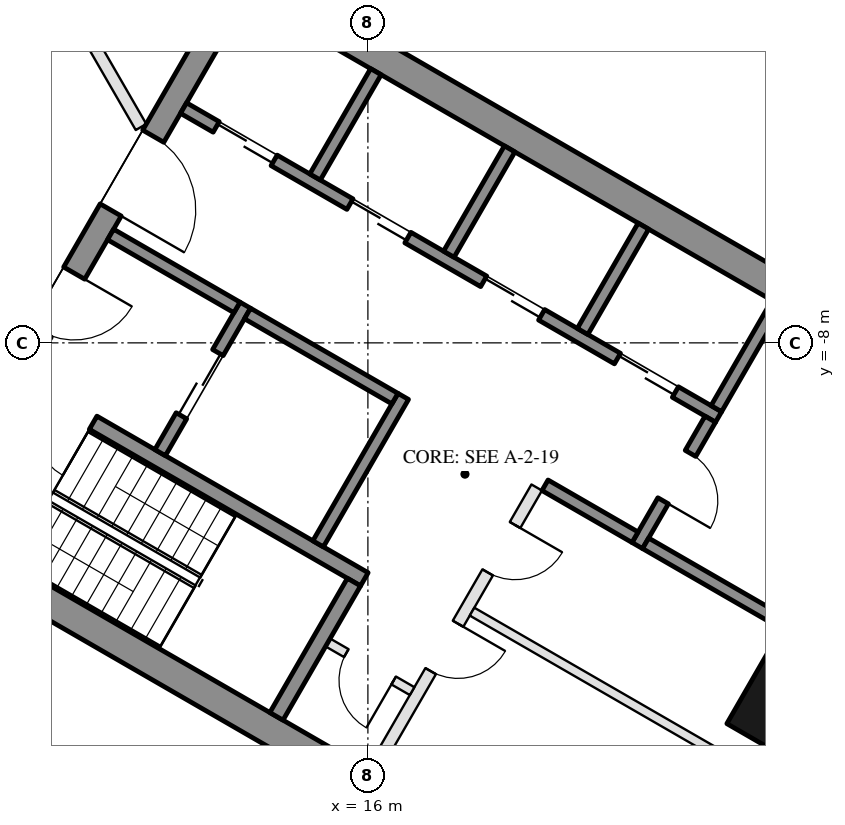
"""IFC4 building model, lengths in metres.
Left out: names, types, materials, properties, quantities, classifications, styles, units other than length and angle.
Written with IfcOpenShell. Run it as: python <this file> out.ifc"""

import sys

from ifc_helpers import new_model, si_unit, direction, frame, frame_2d, origin, origin_2d, place, context, subcontext, project, spatial, rectangle, hollow_rectangle, extrude, element, fill, save


model = new_model("IFC4")
c1 = context("Model", 3, precision=1e-05, world=origin(), true_north=direction((0.0, 1.0)))
c2 = subcontext(c1, "Body", "Model", "MODEL_VIEW")
j1 = project(units=[si_unit("LENGTHUNIT", "METRE"), si_unit("PLANEANGLEUNIT", "RADIAN")], contexts=[c1])
p1 = place(None, origin())
s1 = spatial("IfcSite", under=j1, at=p1, CompositionType="ELEMENT")
p2 = place(p1, origin())
s2 = spatial("IfcBuilding", under=s1, at=p2, CompositionType="ELEMENT")
p3 = place(p2, frame((0.0, 0.0, 90.9)))
s3 = spatial("IfcBuildingStorey", under=s2, at=p3, CompositionType="ELEMENT", Elevation=90.9)
p4 = place(p3, frame((23.643, -13.65, 0.0), z_axis=(0.0, 0.0, 1.0), x_axis=(0.5, 0.866025403784, 0.0)))
e1 = element("IfcColumn", 1, at=p4, inside=s3, PredefinedType="COLUMN", context=c2, shape_type="SweptSolid", body=[
    extrude(hollow_rectangle(XDim=2.8, YDim=2.4, WallThickness=0.07, at=origin_2d()), origin(), (0.0, 0.0, 1.0), 3.7),
])
p5 = place(p3, frame((26.257, -6.567, 0.0), z_axis=(0.0, 0.0, 1.0), x_axis=(-0.500023526245, 0.866011820475, 0.0)))
e2 = element("IfcWall", 2, at=p5, inside=s3, PredefinedType="SOLIDWALL", context=c2, shape_type="SweptSolid", body=[
    extrude(rectangle(XDim=11.816, YDim=0.35, at=frame_2d((5.908, 0.0))), origin(), (0.0, 0.0, 1.0), 3.55),
])
p6 = place(p5, frame((0.38, 0.0, 0.3)))
e3 = element("IfcOpeningElement", 3, at=p6, cuts=e2, PredefinedType="OPENING", context=c2, shape_type="SweptSolid", body=[
    extrude(rectangle(XDim=1.8, YDim=2.65, at=frame_2d((0.9, 1.325))), frame((0.0, 0.185, 0.0), z_axis=(0.0, -1.0, 0.0), x_axis=(1.0, 0.0, 0.0)), (0.0, 0.0, 1.0), 0.37),
])
p7 = place(p5, frame((7.716, 0.0, 0.0)))
e4 = element("IfcOpeningElement", 4, at=p7, cuts=e2, PredefinedType="OPENING", context=c2, shape_type="SweptSolid", body=[
    extrude(rectangle(XDim=2.4, YDim=2.4, at=frame_2d((1.2, 1.2))), frame((0.0, 0.185, 0.0), z_axis=(0.0, -1.0, 0.0), x_axis=(1.0, 0.0, 0.0)), (0.0, 0.0, 1.0), 0.37),
])
p8 = place(p5, frame((3.816, 0.0, 0.3)))
e5 = element("IfcOpeningElement", 5, at=p8, cuts=e2, PredefinedType="OPENING", context=c2, shape_type="SweptSolid", body=[
    extrude(rectangle(XDim=1.6, YDim=2.65, at=frame_2d((0.8, 1.325))), frame((0.0, 0.185, 0.0), z_axis=(0.0, -1.0, 0.0), x_axis=(1.0, 0.0, 0.0)), (0.0, 0.0, 1.0), 0.37),
])
p9 = place(p5, frame((5.716, 0.0, 0.3)))
e6 = element("IfcOpeningElement", 6, at=p9, cuts=e2, PredefinedType="OPENING", context=c2, shape_type="SweptSolid", body=[
    extrude(rectangle(XDim=1.6, YDim=2.65, at=frame_2d((0.8, 1.325))), frame((0.0, 0.185, 0.0), z_axis=(0.0, -1.0, 0.0), x_axis=(1.0, 0.0, 0.0)), (0.0, 0.0, 1.0), 0.37),
])
for number, where, z_axis, x_axis in (
    (7, (8.547, -10.997, 0.0), (0.0, 0.0, 1.0), (0.866, -0.5, 0.0)),
    (8, (13.797, -1.903, 0.0), (0.0, 0.0, 1.0), (0.866, -0.5, 0.0)),
):
    element("IfcWall", number, at=place(p3, frame(where, z_axis=z_axis, x_axis=x_axis)), inside=s3, PredefinedType="SHEAR", context=c2, shape_type="SweptSolid", body=[
        extrude(rectangle(XDim=14.837, YDim=0.5, at=frame_2d((7.418, 0.0))), origin(), (0.0, 0.0, 1.0), 3.5),
    ])
p10 = place(p3, frame((8.845, -10.88, 0.0), z_axis=(0.0, 0.0, 1.0), x_axis=(0.500004234368, 0.866022959057, 0.0)))
e9 = element("IfcWall", 9, at=p10, inside=s3, PredefinedType="SHEAR", context=c2, shape_type="SweptSolid", body=[
    extrude(rectangle(XDim=10.0, YDim=0.4, at=frame_2d((5.0, 0.0))), origin(), (0.0, 0.0, 1.0), 3.5),
])
p11 = place(p10, frame((3.55, 0.0, 0.0)))
e10 = element("IfcOpeningElement", 10, at=p11, cuts=e9, PredefinedType="OPENING", context=c2, shape_type="SweptSolid", body=[
    extrude(rectangle(XDim=1.1, YDim=2.1, at=frame_2d((0.55, 1.05))), frame((0.0, 0.21, 0.0), z_axis=(0.0, -1.0, 0.0), x_axis=(1.0, 0.0, 0.0)), (0.0, 0.0, 1.0), 0.42),
])
p12 = place(p10, frame((5.85, 0.0, 0.0)))
e11 = element("IfcOpeningElement", 11, at=p12, cuts=e9, PredefinedType="OPENING", context=c2, shape_type="SweptSolid", body=[
    extrude(rectangle(XDim=1.4, YDim=2.1, at=frame_2d((0.7, 1.05))), frame((0.0, 0.21, 0.0), z_axis=(0.0, -1.0, 0.0), x_axis=(1.0, 0.0, 0.0)), (0.0, 0.0, 1.0), 0.42),
])
p13 = place(p3, frame((10.356, -8.664, 0.0), z_axis=(0.0, 0.0, 1.0), x_axis=(0.866028629588, -0.499994412703, 0.0)))
e12 = element("IfcWall", 12, at=p13, inside=s3, PredefinedType="SHEAR", context=c2, shape_type="SweptSolid", body=[
    extrude(rectangle(XDim=6.45, YDim=0.25, at=frame_2d((3.225, 0.0))), origin(), (0.0, 0.0, 1.0), 3.5),
])
p14 = place(p13, frame((0.3, 0.0, 0.0)))
e13 = element("IfcOpeningElement", 13, at=p14, cuts=e12, PredefinedType="OPENING", context=c2, shape_type="SweptSolid", body=[
    extrude(rectangle(XDim=1.0, YDim=2.1, at=frame_2d((0.5, 1.05))), frame((0.0, 0.135, 0.0), z_axis=(0.0, -1.0, 0.0), x_axis=(1.0, 0.0, 0.0)), (0.0, 0.0, 1.0), 0.27),
])
p15 = place(p3, frame((14.496, -14.143, 0.0), z_axis=(0.0, 0.0, 1.0), x_axis=(0.500062241894, 0.865989465428, 0.0)))
e14 = element("IfcWall", 14, at=p15, inside=s3, PredefinedType="SHEAR", context=c2, shape_type="SweptSolid", body=[
    extrude(rectangle(XDim=2.55, YDim=0.25, at=frame_2d((1.275, 0.0))), origin(), (0.0, 0.0, 1.0), 3.5),
])
p16 = place(p3, frame((15.181, -11.305, 0.0), z_axis=(0.0, 0.0, 1.0), x_axis=(0.49994636267, 0.866056369097, 0.0)))
e15 = element("IfcWall", 15, at=p16, inside=s3, PredefinedType="SHEAR", context=c2, shape_type="SweptSolid", body=[
    extrude(rectangle(XDim=2.8, YDim=0.2, at=frame_2d((1.4, 0.0))), origin(), (0.0, 0.0, 1.0), 3.5),
])
p17 = place(p3, frame((12.583, -9.805, 0.0), z_axis=(0.0, 0.0, 1.0), x_axis=(0.49994636267, 0.866056369097, 0.0)))
e16 = element("IfcWall", 16, at=p17, inside=s3, PredefinedType="SHEAR", context=c2, shape_type="SweptSolid", body=[
    extrude(rectangle(XDim=2.8, YDim=0.2, at=frame_2d((1.4, 0.0))), origin(), (0.0, 0.0, 1.0), 3.5),
])
p18 = place(p17, frame((0.7, 0.0, 0.0)))
e17 = element("IfcOpeningElement", 17, at=p18, cuts=e16, PredefinedType="OPENING", context=c2, shape_type="SweptSolid", body=[
    extrude(rectangle(XDim=1.2, YDim=2.1, at=frame_2d((0.6, 1.05))), frame((0.0, 0.11, 0.0), z_axis=(0.0, -1.0, 0.0), x_axis=(1.0, 0.0, 0.0)), (0.0, 0.0, 1.0), 0.22),
])
p19 = place(p3, frame((11.768, -6.217, 0.0), z_axis=(0.0, 0.0, 1.0), x_axis=(0.866050077142, -0.499957262057, 0.0)))
e18 = element("IfcWall", 18, at=p19, inside=s3, PredefinedType="SHEAR", context=c2, shape_type="SweptSolid", body=[
    extrude(rectangle(XDim=2.4, YDim=0.2, at=frame_2d((1.2, 0.0))), origin(), (0.0, 0.0, 1.0), 3.5),
])
p20 = place(p3, frame((14.02, -7.517, 0.0), z_axis=(0.0, 0.0, 1.0), x_axis=(0.866034573852, -0.49998411664, 0.0)))
e19 = element("IfcWall", 19, at=p20, inside=s3, PredefinedType="SHEAR", context=c2, shape_type="SweptSolid", body=[
    extrude(rectangle(XDim=2.8, YDim=0.2, at=frame_2d((1.4, 0.0))), origin(), (0.0, 0.0, 1.0), 3.5),
])
p21 = place(p3, frame((12.968, -4.138, 0.0), z_axis=(0.0, 0.0, 1.0), x_axis=(0.866028328073, -0.49999493495, 0.0)))
e20 = element("IfcWall", 20, at=p21, inside=s3, PredefinedType="SHEAR", context=c2, shape_type="SweptSolid", body=[
    extrude(rectangle(XDim=10.16, YDim=0.2, at=frame_2d((5.08, 0.0))), origin(), (0.0, 0.0, 1.0), 3.5),
])
p22 = place(p21, frame((0.62, 0.0, 0.0)))
e21 = element("IfcOpeningElement", 21, at=p22, cuts=e20, PredefinedType="OPENING", context=c2, shape_type="SweptSolid", body=[
    extrude(rectangle(XDim=1.1, YDim=2.1, at=frame_2d((0.55, 1.05))), frame((0.0, 0.11, 0.0), z_axis=(0.0, -1.0, 0.0), x_axis=(1.0, 0.0, 0.0)), (0.0, 0.0, 1.0), 0.22),
])
p23 = place(p21, frame((3.16, 0.0, 0.0)))
e22 = element("IfcOpeningElement", 22, at=p23, cuts=e20, PredefinedType="OPENING", context=c2, shape_type="SweptSolid", body=[
    extrude(rectangle(XDim=1.1, YDim=2.1, at=frame_2d((0.55, 1.05))), frame((0.0, 0.11, 0.0), z_axis=(0.0, -1.0, 0.0), x_axis=(1.0, 0.0, 0.0)), (0.0, 0.0, 1.0), 0.22),
])
p24 = place(p21, frame((5.7, 0.0, 0.0)))
e23 = element("IfcOpeningElement", 23, at=p24, cuts=e20, PredefinedType="OPENING", context=c2, shape_type="SweptSolid", body=[
    extrude(rectangle(XDim=1.1, YDim=2.1, at=frame_2d((0.55, 1.05))), frame((0.0, 0.11, 0.0), z_axis=(0.0, -1.0, 0.0), x_axis=(1.0, 0.0, 0.0)), (0.0, 0.0, 1.0), 0.22),
])
p25 = place(p21, frame((8.24, 0.0, 0.0)))
e24 = element("IfcOpeningElement", 24, at=p25, cuts=e20, PredefinedType="OPENING", context=c2, shape_type="SweptSolid", body=[
    extrude(rectangle(XDim=1.1, YDim=2.1, at=frame_2d((0.55, 1.05))), frame((0.0, 0.11, 0.0), z_axis=(0.0, -1.0, 0.0), x_axis=(1.0, 0.0, 0.0)), (0.0, 0.0, 1.0), 0.22),
])
p26 = place(p3, frame((20.43, -11.333, 0.0), z_axis=(0.0, 0.0, 1.0), x_axis=(0.500001309137, 0.866024647952, 0.0)))
e25 = element("IfcWall", 25, at=p26, inside=s3, PredefinedType="SHEAR", context=c2, shape_type="SweptSolid", body=[
    extrude(rectangle(XDim=2.4, YDim=0.2, at=frame_2d((1.2, 0.0))), origin(), (0.0, 0.0, 1.0), 3.5),
])
p27 = place(p26, frame((0.85, 0.0, 0.0)))
e26 = element("IfcOpeningElement", 26, at=p27, cuts=e25, PredefinedType="OPENING", context=c2, shape_type="SweptSolid", body=[
    extrude(rectangle(XDim=0.9, YDim=2.1, at=frame_2d((0.45, 1.05))), frame((0.0, 0.11, 0.0), z_axis=(0.0, -1.0, 0.0), x_axis=(1.0, 0.0, 0.0)), (0.0, 0.0, 1.0), 0.22),
])
p28 = place(p3, frame((18.913, -10.342, 0.0), z_axis=(0.0, 0.0, 1.0), x_axis=(0.866038183914, -0.499977863513, 0.0)))
e27 = element("IfcWall", 27, at=p28, inside=s3, PredefinedType="SHEAR", context=c2, shape_type="SweptSolid", body=[
    extrude(rectangle(XDim=1.71, YDim=0.2, at=frame_2d((0.855, 0.0))), origin(), (0.0, 0.0, 1.0), 3.5),
])
for number, where, z_axis, x_axis in (
    (28, (15.131, -5.272, 0.0), (0.0, 0.0, 1.0), (0.5, 0.866, 0.0)),
    (29, (17.331, -6.542, 0.0), (0.0, 0.0, 1.0), (0.5, 0.866, 0.0)),
    (30, (19.531, -7.812, 0.0), (0.0, 0.0, 1.0), (0.5, 0.866, 0.0)),
    (31, (21.73, -9.082, 0.0), (0.0, 0.0, 1.0), (0.5, 0.866, 0.0)),
):
    element("IfcWall", number, at=place(p3, frame(where, z_axis=z_axis, x_axis=x_axis)), inside=s3, PredefinedType="SHEAR", context=c2, shape_type="SweptSolid", body=[
        extrude(rectangle(XDim=2.0, YDim=0.2, at=frame_2d((1.0, 0.0))), origin(), (0.0, 0.0, 1.0), 3.5),
    ])
p29 = place(p3, frame((20.567, -11.297, 0.0), z_axis=(0.0, 0.0, 1.0), x_axis=(0.866060851709, -0.499938597367, 0.0)))
e32 = element("IfcWall", 32, at=p29, inside=s3, PredefinedType="SHEAR", context=c2, shape_type="SweptSolid", body=[
    extrude(rectangle(XDim=2.64, YDim=0.2, at=frame_2d((1.32, 0.0))), origin(), (0.0, 0.0, 1.0), 3.5),
])
p30 = place(p3, frame((16.076, -15.055, 0.0), z_axis=(0.0, 0.0, 1.0), x_axis=(0.499995103361, 0.866028230842, 0.0)))
e33 = element("IfcWall", 33, at=p30, inside=s3, PredefinedType="PARTITIONING", context=c2, shape_type="SweptSolid", body=[
    extrude(rectangle(XDim=5.4, YDim=0.2, at=frame_2d((2.7, 0.0))), origin(), (0.0, 0.0, 1.0), 3.5),
])
p31 = place(p30, frame((1.913, 0.0, 0.0)))
e34 = element("IfcOpeningElement", 34, at=p31, cuts=e33, PredefinedType="OPENING", context=c2, shape_type="SweptSolid", body=[
    extrude(rectangle(XDim=0.9, YDim=2.1, at=frame_2d((0.45, 1.05))), frame((0.0, 0.11, 0.0), z_axis=(0.0, -1.0, 0.0), x_axis=(1.0, 0.0, 0.0)), (0.0, 0.0, 1.0), 0.22),
])
p32 = place(p30, frame((3.788, 0.0, 0.0)))
e35 = element("IfcOpeningElement", 35, at=p32, cuts=e33, PredefinedType="OPENING", context=c2, shape_type="SweptSolid", body=[
    extrude(rectangle(XDim=0.9, YDim=2.1, at=frame_2d((0.45, 1.05))), frame((0.0, 0.11, 0.0), z_axis=(0.0, -1.0, 0.0), x_axis=(1.0, 0.0, 0.0)), (0.0, 0.0, 1.0), 0.22),
])
p33 = place(p3, frame((15.342, -12.928, 0.0), z_axis=(0.0, 0.0, 1.0), x_axis=(0.865989903783, -0.500061482766, 0.0)))
e36 = element("IfcWall", 36, at=p33, inside=s3, PredefinedType="PARTITIONING", context=c2, shape_type="SweptSolid", body=[
    extrude(rectangle(XDim=1.6, YDim=0.15, at=frame_2d((0.8, 0.0))), origin(), (0.0, 0.0, 1.0), 3.5),
])
p34 = place(p33, frame((0.35, 0.0, 0.0)))
e37 = element("IfcOpeningElement", 37, at=p34, cuts=e36, PredefinedType="OPENING", context=c2, shape_type="SweptSolid", body=[
    extrude(rectangle(XDim=0.9, YDim=2.1, at=frame_2d((0.45, 1.05))), frame((0.0, 0.085, 0.0), z_axis=(0.0, -1.0, 0.0), x_axis=(1.0, 0.0, 0.0)), (0.0, 0.0, 1.0), 0.17),
])
p35 = place(p3, frame((17.713, -12.42, 0.0), z_axis=(0.0, 0.0, 1.0), x_axis=(0.866016523273, -0.500015381182, 0.0)))
e38 = element("IfcWall", 38, at=p35, inside=s3, PredefinedType="PARTITIONING", context=c2, shape_type="SweptSolid", body=[
    extrude(rectangle(XDim=6.95, YDim=0.15, at=frame_2d((3.475, 0.0))), origin(), (0.0, 0.0, 1.0), 3.5),
])
p36 = place(p3, frame((9.625, 0.13, 0.0), z_axis=(0.0, 0.0, 1.0), x_axis=(0.500036828865, -0.866004139585, 0.0)))
e39 = element("IfcWall", 39, at=p36, inside=s3, PredefinedType="PARTITIONING", context=c2, shape_type="SweptSolid", body=[
    extrude(rectangle(XDim=5.288, YDim=0.2, at=frame_2d((2.644, 0.0))), origin(), (0.0, 0.0, 1.0), 2.95),
])
p37 = place(p36, frame((2.144, 0.0, 0.0)))
e40 = element("IfcOpeningElement", 40, at=p37, cuts=e39, PredefinedType="OPENING", context=c2, shape_type="SweptSolid", body=[
    extrude(rectangle(XDim=1.0, YDim=2.1, at=frame_2d((0.5, 1.05))), frame((0.0, 0.11, 0.0), z_axis=(0.0, -1.0, 0.0), x_axis=(1.0, 0.0, 0.0)), (0.0, 0.0, 1.0), 0.22),
])
p38 = place(p18, origin())
e41 = element("IfcDoor", 41, at=p38, inside=s3, OperationType="DOUBLE_DOOR_SLIDING", PredefinedType="DOOR", context=c2, shape_type="SweptSolid", body=[
    extrude(rectangle(XDim=1.2, YDim=2.1, at=frame_2d((0.6, 1.05))), frame((0.0, 0.025, 0.0), z_axis=(0.0, -1.0, 0.0), x_axis=(1.0, 0.0, 0.0)), (0.0, 0.0, 1.0), 0.05),
])
fill(e17, e41)
p39 = place(p34, frame((0.9, 0.0, 0.0), z_axis=(0.0, 0.0, 1.0), x_axis=(-1.0, 0.0, 0.0)))
e42 = element("IfcDoor", 42, at=p39, inside=s3, OperationType="SINGLE_SWING_LEFT", PredefinedType="DOOR", context=c2, shape_type="SweptSolid", body=[
    extrude(rectangle(XDim=0.9, YDim=2.1, at=frame_2d((0.45, 1.05))), frame((0.0, 0.025, 0.0), z_axis=(0.0, -1.0, 0.0), x_axis=(1.0, 0.0, 0.0)), (0.0, 0.0, 1.0), 0.05),
])
fill(e37, e42)
p40 = place(p22, origin())
e43 = element("IfcDoor", 43, at=p40, inside=s3, OperationType="DOUBLE_DOOR_SLIDING", PredefinedType="DOOR", context=c2, shape_type="SweptSolid", body=[
    extrude(rectangle(XDim=1.1, YDim=2.1, at=frame_2d((0.55, 1.05))), frame((0.0, 0.025, 0.0), z_axis=(0.0, -1.0, 0.0), x_axis=(1.0, 0.0, 0.0)), (0.0, 0.0, 1.0), 0.05),
])
fill(e21, e43)
p41 = place(p23, origin())
e44 = element("IfcDoor", 44, at=p41, inside=s3, OperationType="DOUBLE_DOOR_SLIDING", PredefinedType="DOOR", context=c2, shape_type="SweptSolid", body=[
    extrude(rectangle(XDim=1.1, YDim=2.1, at=frame_2d((0.55, 1.05))), frame((0.0, 0.025, 0.0), z_axis=(0.0, -1.0, 0.0), x_axis=(1.0, 0.0, 0.0)), (0.0, 0.0, 1.0), 0.05),
])
fill(e22, e44)
p42 = place(p24, origin())
e45 = element("IfcDoor", 45, at=p42, inside=s3, OperationType="DOUBLE_DOOR_SLIDING", PredefinedType="DOOR", context=c2, shape_type="SweptSolid", body=[
    extrude(rectangle(XDim=1.1, YDim=2.1, at=frame_2d((0.55, 1.05))), frame((0.0, 0.025, 0.0), z_axis=(0.0, -1.0, 0.0), x_axis=(1.0, 0.0, 0.0)), (0.0, 0.0, 1.0), 0.05),
])
fill(e23, e45)
p43 = place(p25, origin())
e46 = element("IfcDoor", 46, at=p43, inside=s3, OperationType="DOUBLE_DOOR_SLIDING", PredefinedType="DOOR", context=c2, shape_type="SweptSolid", body=[
    extrude(rectangle(XDim=1.1, YDim=2.1, at=frame_2d((0.55, 1.05))), frame((0.0, 0.025, 0.0), z_axis=(0.0, -1.0, 0.0), x_axis=(1.0, 0.0, 0.0)), (0.0, 0.0, 1.0), 0.05),
])
fill(e24, e46)
p44 = place(p27, frame((0.9, 0.0, 0.0), z_axis=(0.0, 0.0, 1.0), x_axis=(-1.0, 0.0, 0.0)))
e47 = element("IfcDoor", 47, at=p44, inside=s3, OperationType="SINGLE_SWING_RIGHT", PredefinedType="DOOR", context=c2, shape_type="SweptSolid", body=[
    extrude(rectangle(XDim=0.9, YDim=2.1, at=frame_2d((0.45, 1.05))), frame((0.0, 0.025, 0.0), z_axis=(0.0, -1.0, 0.0), x_axis=(1.0, 0.0, 0.0)), (0.0, 0.0, 1.0), 0.05),
])
fill(e26, e47)
p45 = place(p31, frame((0.9, 0.0, 0.0), z_axis=(0.0, 0.0, 1.0), x_axis=(-1.0, 0.0, 0.0)))
e48 = element("IfcDoor", 48, at=p45, inside=s3, OperationType="SINGLE_SWING_LEFT", PredefinedType="DOOR", context=c2, shape_type="SweptSolid", body=[
    extrude(rectangle(XDim=0.9, YDim=2.1, at=frame_2d((0.45, 1.05))), frame((0.0, 0.025, 0.0), z_axis=(0.0, -1.0, 0.0), x_axis=(1.0, 0.0, 0.0)), (0.0, 0.0, 1.0), 0.05),
])
fill(e34, e48)
p46 = place(p32, frame((0.9, 0.0, 0.0), z_axis=(0.0, 0.0, 1.0), x_axis=(-1.0, 0.0, 0.0)))
e49 = element("IfcDoor", 49, at=p46, inside=s3, OperationType="SINGLE_SWING_LEFT", PredefinedType="DOOR", context=c2, shape_type="SweptSolid", body=[
    extrude(rectangle(XDim=0.9, YDim=2.1, at=frame_2d((0.45, 1.05))), frame((0.0, 0.025, 0.0), z_axis=(0.0, -1.0, 0.0), x_axis=(1.0, 0.0, 0.0)), (0.0, 0.0, 1.0), 0.05),
])
fill(e35, e49)
p47 = place(p11, frame((1.1, 0.0, 0.0), z_axis=(0.0, 0.0, 1.0), x_axis=(-1.0, 0.0, 0.0)))
e50 = element("IfcDoor", 50, at=p47, inside=s3, OperationType="SINGLE_SWING_LEFT", PredefinedType="DOOR", context=c2, shape_type="SweptSolid", body=[
    extrude(rectangle(XDim=1.1, YDim=2.1, at=frame_2d((0.55, 1.05))), frame((0.0, 0.025, 0.0), z_axis=(0.0, -1.0, 0.0), x_axis=(1.0, 0.0, 0.0)), (0.0, 0.0, 1.0), 0.05),
])
fill(e10, e50)
p48 = place(p12, frame((1.4, 0.0, 0.0), z_axis=(0.0, 0.0, 1.0), x_axis=(-1.0, 0.0, 0.0)))
e51 = element("IfcDoor", 51, at=p48, inside=s3, OperationType="DOUBLE_DOOR_SINGLE_SWING", PredefinedType="DOOR", context=c2, shape_type="SweptSolid", body=[
    extrude(rectangle(XDim=1.4, YDim=2.1, at=frame_2d((0.7, 1.05))), frame((0.0, 0.025, 0.0), z_axis=(0.0, -1.0, 0.0), x_axis=(1.0, 0.0, 0.0)), (0.0, 0.0, 1.0), 0.05),
])
fill(e11, e51)
p49 = place(p14, frame((1.0, 0.0, 0.0), z_axis=(0.0, 0.0, 1.0), x_axis=(-1.0, 0.0, 0.0)))
e52 = element("IfcDoor", 52, at=p49, inside=s3, OperationType="SINGLE_SWING_LEFT", PredefinedType="DOOR", context=c2, shape_type="SweptSolid", body=[
    extrude(rectangle(XDim=1.0, YDim=2.1, at=frame_2d((0.5, 1.05))), frame((0.0, 0.025, 0.0), z_axis=(0.0, -1.0, 0.0), x_axis=(1.0, 0.0, 0.0)), (0.0, 0.0, 1.0), 0.05),
])
fill(e13, e52)
save(model, sys.argv[1])
